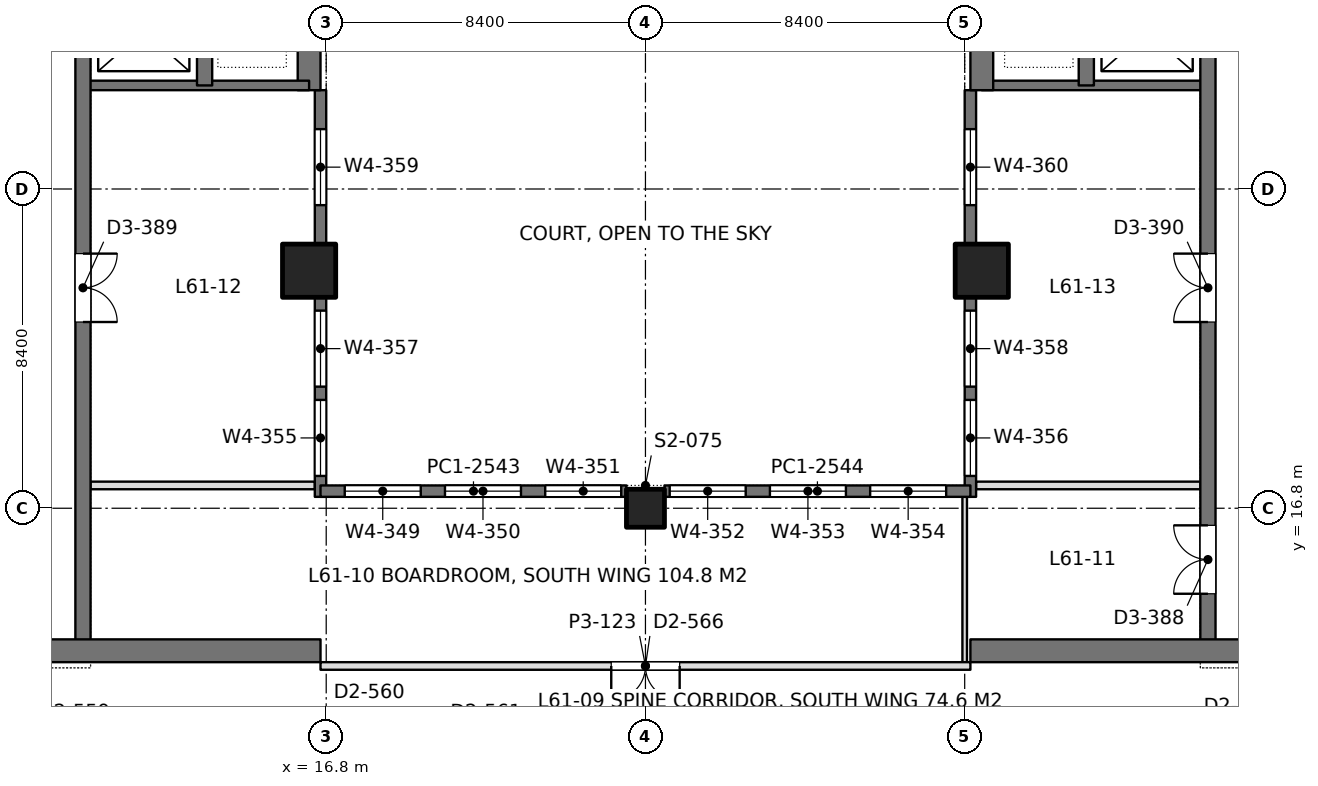
"""IFC4 building model, lengths in metres.
Left out: names, types, materials, properties, quantities, classifications, styles, units other than length and angle.
Written with IfcOpenShell. Run it as: python <this file> out.ifc"""

import sys

from ifc_helpers import new_model, si_unit, direction, frame, frame_2d, origin, origin_2d, place, context, subcontext, project, spatial, rectangle, extrude, element, fill, save


model = new_model("IFC4")
c1 = context("Model", 3, precision=1e-05, world=origin(), true_north=direction((0.0, 1.0)))
c2 = subcontext(c1, "Body", "Model", "MODEL_VIEW")
j1 = project(units=[si_unit("LENGTHUNIT", "METRE"), si_unit("PLANEANGLEUNIT", "RADIAN")], contexts=[c1])
p1 = place(None, origin())
s1 = spatial("IfcSite", under=j1, at=p1, CompositionType="ELEMENT")
p2 = place(p1, origin())
s2 = spatial("IfcBuilding", under=s1, at=p2, CompositionType="ELEMENT")
p3 = place(p2, frame((0.0, 0.0, 268.2)))
s3 = spatial("IfcBuildingStorey", under=s2, at=p3, CompositionType="ELEMENT", Elevation=268.2)
p4 = place(p3, frame((25.2, 16.8, 0.0), z_axis=(0.0, 0.0, 1.0), x_axis=(1.0, 0.0, 0.0)))
e1 = element("IfcColumn", 1, at=p4, inside=s3, PredefinedType="COLUMN", context=c2, shape_type="SweptSolid", body=[
    extrude(rectangle(XDim=1.0, YDim=1.0, at=origin_2d()), origin(), (0.0, 0.0, 1.0), 4.5),
])
for number, where, z_axis, x_axis in (
    (2, (16.35, 23.05, 0.0), (0.0, 0.0, 1.0), (1.0, 0.0, 0.0)),
    (3, (34.05, 23.05, 0.0), (0.0, 0.0, 1.0), (1.0, 0.0, 0.0)),
):
    element("IfcColumn", number, at=place(p3, frame(where, z_axis=z_axis, x_axis=x_axis)), inside=s3, PredefinedType="COLUMN", context=c2, shape_type="SweptSolid", body=[
        extrude(rectangle(XDim=1.4, YDim=1.4, at=origin_2d()), origin(), (0.0, 0.0, 1.0), 4.5),
    ])
p5 = place(p3, frame((-1.05, 13.05, 0.0), z_axis=(0.0, 0.0, 1.0), x_axis=(1.0, 0.0, 0.0)))
e4 = element("IfcWall", 4, at=p5, inside=s3, PredefinedType="SHEAR", context=c2, shape_type="SweptSolid", body=[
    extrude(rectangle(XDim=17.7, YDim=0.6, at=frame_2d((8.85, 0.0))), origin(), (0.0, 0.0, 1.0), 4.5),
])
p6 = place(p5, frame((8.8, 0.0, 0.0)))
e5 = element("IfcOpeningElement", 5, at=p6, cuts=e4, PredefinedType="OPENING", context=c2, shape_type="SweptSolid", body=[
    extrude(rectangle(XDim=1.8, YDim=2.4, at=frame_2d((0.9, 1.2))), frame((0.0, 0.31, 0.0), z_axis=(0.0, -1.0, 0.0), x_axis=(1.0, 0.0, 0.0)), (0.0, 0.0, 1.0), 0.62),
])
p7 = place(p3, frame((16.35, 27.8, 0.0), z_axis=(0.0, 0.0, 1.0), x_axis=(0.0, 1.0, 0.0)))
e6 = element("IfcWall", 6, at=p7, inside=s3, PredefinedType="SHEAR", context=c2, shape_type="SweptSolid", body=[
    extrude(rectangle(XDim=9.55, YDim=0.6, at=frame_2d((4.775, 0.0))), origin(), (0.0, 0.0, 1.0), 4.5),
])
p8 = place(p3, frame((10.4, 13.05, 0.0), z_axis=(0.0, 0.0, 1.0), x_axis=(0.0, 1.0, 0.0)))
e7 = element("IfcWall", 7, at=p8, inside=s3, PredefinedType="SHEAR", context=c2, shape_type="SweptSolid", body=[
    extrude(rectangle(XDim=24.3, YDim=0.4, at=frame_2d((12.15, 0.0))), origin(), (0.0, 0.0, 1.0), 4.5),
])
p9 = place(p8, frame((15.75, 0.0, 0.0)))
e8 = element("IfcOpeningElement", 8, at=p9, cuts=e7, PredefinedType="OPENING", context=c2, shape_type="SweptSolid", body=[
    extrude(rectangle(XDim=1.1, YDim=2.2, at=frame_2d((0.55, 1.1))), frame((0.0, 0.21, 0.0), z_axis=(0.0, -1.0, 0.0), x_axis=(1.0, 0.0, 0.0)), (0.0, 0.0, 1.0), 0.42),
])
p10 = place(p8, frame((18.6, 0.0, 0.0)))
e9 = element("IfcOpeningElement", 9, at=p10, cuts=e7, PredefinedType="OPENING", context=c2, shape_type="SweptSolid", body=[
    extrude(rectangle(XDim=1.1, YDim=2.2, at=frame_2d((0.55, 1.1))), frame((0.0, 0.21, 0.0), z_axis=(0.0, -1.0, 0.0), x_axis=(1.0, 0.0, 0.0)), (0.0, 0.0, 1.0), 0.42),
])
p11 = place(p8, frame((21.45, 0.0, 0.0)))
e10 = element("IfcOpeningElement", 10, at=p11, cuts=e7, PredefinedType="OPENING", context=c2, shape_type="SweptSolid", body=[
    extrude(rectangle(XDim=1.1, YDim=2.2, at=frame_2d((0.55, 1.1))), frame((0.0, 0.21, 0.0), z_axis=(0.0, -1.0, 0.0), x_axis=(1.0, 0.0, 0.0)), (0.0, 0.0, 1.0), 0.42),
])
p12 = place(p8, frame((8.65, 0.0, 0.0)))
e11 = element("IfcOpeningElement", 11, at=p12, cuts=e7, PredefinedType="OPENING", context=c2, shape_type="SweptSolid", body=[
    extrude(rectangle(XDim=1.8, YDim=2.4, at=frame_2d((0.9, 1.2))), frame((0.0, 0.21, 0.0), z_axis=(0.0, -1.0, 0.0), x_axis=(1.0, 0.0, 0.0)), (0.0, 0.0, 1.0), 0.42),
])
p13 = place(p3, frame((13.6, 27.925, 0.0), z_axis=(0.0, 0.0, 1.0), x_axis=(0.0, 1.0, 0.0)))
e12 = element("IfcWall", 12, at=p13, inside=s3, PredefinedType="SHEAR", context=c2, shape_type="SweptSolid", body=[
    extrude(rectangle(XDim=9.425, YDim=0.4, at=frame_2d((4.712, 0.0))), origin(), (0.0, 0.0, 1.0), 4.5),
])
p14 = place(p3, frame((10.4, 27.925, 0.0), z_axis=(0.0, 0.0, 1.0), x_axis=(1.0, 0.0, 0.0)))
e13 = element("IfcWall", 13, at=p14, inside=s3, PredefinedType="SHEAR", context=c2, shape_type="SweptSolid", body=[
    extrude(rectangle(XDim=5.95, YDim=0.25, at=frame_2d((2.975, 0.0))), origin(), (0.0, 0.0, 1.0), 4.5),
])
p15 = place(p3, frame((33.75, 13.05, 0.0), z_axis=(0.0, 0.0, 1.0), x_axis=(1.0, 0.0, 0.0)))
e14 = element("IfcWall", 14, at=p15, inside=s3, PredefinedType="SHEAR", context=c2, shape_type="SweptSolid", body=[
    extrude(rectangle(XDim=17.7, YDim=0.6, at=frame_2d((8.85, 0.0))), origin(), (0.0, 0.0, 1.0), 4.5),
])
p16 = place(p15, frame((7.1, 0.0, 0.0)))
e15 = element("IfcOpeningElement", 15, at=p16, cuts=e14, PredefinedType="OPENING", context=c2, shape_type="SweptSolid", body=[
    extrude(rectangle(XDim=1.8, YDim=2.4, at=frame_2d((0.9, 1.2))), frame((0.0, 0.31, 0.0), z_axis=(0.0, -1.0, 0.0), x_axis=(1.0, 0.0, 0.0)), (0.0, 0.0, 1.0), 0.62),
])
p17 = place(p3, frame((34.05, 27.8, 0.0), z_axis=(0.0, 0.0, 1.0), x_axis=(0.0, 1.0, 0.0)))
e16 = element("IfcWall", 16, at=p17, inside=s3, PredefinedType="SHEAR", context=c2, shape_type="SweptSolid", body=[
    extrude(rectangle(XDim=9.55, YDim=0.6, at=frame_2d((4.775, 0.0))), origin(), (0.0, 0.0, 1.0), 4.5),
])
p18 = place(p3, frame((40.0, 13.05, 0.0), z_axis=(0.0, 0.0, 1.0), x_axis=(0.0, 1.0, 0.0)))
e17 = element("IfcWall", 17, at=p18, inside=s3, PredefinedType="SHEAR", context=c2, shape_type="SweptSolid", body=[
    extrude(rectangle(XDim=24.3, YDim=0.4, at=frame_2d((12.15, 0.0))), origin(), (0.0, 0.0, 1.0), 4.5),
])
p19 = place(p18, frame((15.75, 0.0, 0.0)))
e18 = element("IfcOpeningElement", 18, at=p19, cuts=e17, PredefinedType="OPENING", context=c2, shape_type="SweptSolid", body=[
    extrude(rectangle(XDim=1.1, YDim=2.2, at=frame_2d((0.55, 1.1))), frame((0.0, 0.21, 0.0), z_axis=(0.0, -1.0, 0.0), x_axis=(1.0, 0.0, 0.0)), (0.0, 0.0, 1.0), 0.42),
])
p20 = place(p18, frame((18.6, 0.0, 0.0)))
e19 = element("IfcOpeningElement", 19, at=p20, cuts=e17, PredefinedType="OPENING", context=c2, shape_type="SweptSolid", body=[
    extrude(rectangle(XDim=1.1, YDim=2.2, at=frame_2d((0.55, 1.1))), frame((0.0, 0.21, 0.0), z_axis=(0.0, -1.0, 0.0), x_axis=(1.0, 0.0, 0.0)), (0.0, 0.0, 1.0), 0.42),
])
p21 = place(p18, frame((21.45, 0.0, 0.0)))
e20 = element("IfcOpeningElement", 20, at=p21, cuts=e17, PredefinedType="OPENING", context=c2, shape_type="SweptSolid", body=[
    extrude(rectangle(XDim=1.1, YDim=2.2, at=frame_2d((0.55, 1.1))), frame((0.0, 0.21, 0.0), z_axis=(0.0, -1.0, 0.0), x_axis=(1.0, 0.0, 0.0)), (0.0, 0.0, 1.0), 0.42),
])
p22 = place(p18, frame((8.65, 0.0, 0.0)))
e21 = element("IfcOpeningElement", 21, at=p22, cuts=e17, PredefinedType="OPENING", context=c2, shape_type="SweptSolid", body=[
    extrude(rectangle(XDim=1.8, YDim=2.4, at=frame_2d((0.9, 1.2))), frame((0.0, 0.21, 0.0), z_axis=(0.0, -1.0, 0.0), x_axis=(1.0, 0.0, 0.0)), (0.0, 0.0, 1.0), 0.42),
])
p23 = place(p18, frame((1.5, 0.0, 0.0)))
e22 = element("IfcOpeningElement", 22, at=p23, cuts=e17, PredefinedType="OPENING", context=c2, shape_type="SweptSolid", body=[
    extrude(rectangle(XDim=1.8, YDim=2.4, at=frame_2d((0.9, 1.2))), frame((0.0, 0.21, 0.0), z_axis=(0.0, -1.0, 0.0), x_axis=(1.0, 0.0, 0.0)), (0.0, 0.0, 1.0), 0.42),
])
p24 = place(p3, frame((36.8, 27.925, 0.0), z_axis=(0.0, 0.0, 1.0), x_axis=(0.0, 1.0, 0.0)))
e23 = element("IfcWall", 23, at=p24, inside=s3, PredefinedType="SHEAR", context=c2, shape_type="SweptSolid", body=[
    extrude(rectangle(XDim=9.425, YDim=0.4, at=frame_2d((4.712, 0.0))), origin(), (0.0, 0.0, 1.0), 4.5),
])
p25 = place(p3, frame((40.0, 27.925, 0.0), z_axis=(0.0, 0.0, 1.0), x_axis=(-1.0, 0.0, 0.0)))
e24 = element("IfcWall", 24, at=p25, inside=s3, PredefinedType="SHEAR", context=c2, shape_type="SweptSolid", body=[
    extrude(rectangle(XDim=5.95, YDim=0.25, at=frame_2d((2.975, 0.0))), origin(), (0.0, 0.0, 1.0), 4.5),
])
p26 = place(p3, frame((16.65, 17.1, 0.0), z_axis=(0.0, 0.0, 1.0), x_axis=(0.0, 1.0, 0.0)))
e25 = element("IfcWall", 25, at=p26, inside=s3, PredefinedType="SOLIDWALL", context=c2, shape_type="SweptSolid", body=[
    extrude(rectangle(XDim=10.7, YDim=0.3, at=frame_2d((5.35, 0.0))), origin(), (0.0, 0.0, 1.0), 4.35),
])
p27 = place(p26, frame((0.55, 0.0, 0.9)))
e26 = element("IfcOpeningElement", 26, at=p27, cuts=e25, PredefinedType="OPENING", context=c2, shape_type="SweptSolid", body=[
    extrude(rectangle(XDim=2.0, YDim=1.9, at=frame_2d((1.0, 0.95))), frame((0.0, 0.16, 0.0), z_axis=(0.0, -1.0, 0.0), x_axis=(1.0, 0.0, 0.0)), (0.0, 0.0, 1.0), 0.32),
])
p28 = place(p26, frame((2.9, 0.0, 0.9)))
e27 = element("IfcOpeningElement", 27, at=p28, cuts=e25, PredefinedType="OPENING", context=c2, shape_type="SweptSolid", body=[
    extrude(rectangle(XDim=2.0, YDim=1.9, at=frame_2d((1.0, 0.95))), frame((0.0, 0.16, 0.0), z_axis=(0.0, -1.0, 0.0), x_axis=(1.0, 0.0, 0.0)), (0.0, 0.0, 1.0), 0.32),
])
p29 = place(p26, frame((7.675, 0.0, 0.9)))
e28 = element("IfcOpeningElement", 28, at=p29, cuts=e25, PredefinedType="OPENING", context=c2, shape_type="SweptSolid", body=[
    extrude(rectangle(XDim=2.0, YDim=1.9, at=frame_2d((1.0, 0.95))), frame((0.0, 0.16, 0.0), z_axis=(0.0, -1.0, 0.0), x_axis=(1.0, 0.0, 0.0)), (0.0, 0.0, 1.0), 0.32),
])
p30 = place(p3, frame((33.75, 17.1, 0.0), z_axis=(0.0, 0.0, 1.0), x_axis=(0.0, 1.0, 0.0)))
e29 = element("IfcWall", 29, at=p30, inside=s3, PredefinedType="SOLIDWALL", context=c2, shape_type="SweptSolid", body=[
    extrude(rectangle(XDim=10.7, YDim=0.3, at=frame_2d((5.35, 0.0))), origin(), (0.0, 0.0, 1.0), 4.35),
])
p31 = place(p30, frame((0.55, 0.0, 0.9)))
e30 = element("IfcOpeningElement", 30, at=p31, cuts=e29, PredefinedType="OPENING", context=c2, shape_type="SweptSolid", body=[
    extrude(rectangle(XDim=2.0, YDim=1.9, at=frame_2d((1.0, 0.95))), frame((0.0, 0.16, 0.0), z_axis=(0.0, -1.0, 0.0), x_axis=(1.0, 0.0, 0.0)), (0.0, 0.0, 1.0), 0.32),
])
p32 = place(p30, frame((2.9, 0.0, 0.9)))
e31 = element("IfcOpeningElement", 31, at=p32, cuts=e29, PredefinedType="OPENING", context=c2, shape_type="SweptSolid", body=[
    extrude(rectangle(XDim=2.0, YDim=1.9, at=frame_2d((1.0, 0.95))), frame((0.0, 0.16, 0.0), z_axis=(0.0, -1.0, 0.0), x_axis=(1.0, 0.0, 0.0)), (0.0, 0.0, 1.0), 0.32),
])
p33 = place(p30, frame((7.675, 0.0, 0.9)))
e32 = element("IfcOpeningElement", 32, at=p33, cuts=e29, PredefinedType="OPENING", context=c2, shape_type="SweptSolid", body=[
    extrude(rectangle(XDim=2.0, YDim=1.9, at=frame_2d((1.0, 0.95))), frame((0.0, 0.16, 0.0), z_axis=(0.0, -1.0, 0.0), x_axis=(1.0, 0.0, 0.0)), (0.0, 0.0, 1.0), 0.32),
])
p34 = place(p3, frame((16.65, 17.25, 0.0), z_axis=(0.0, 0.0, 1.0), x_axis=(1.0, 0.0, 0.0)))
e33 = element("IfcWall", 33, at=p34, inside=s3, PredefinedType="SOLIDWALL", context=c2, shape_type="SweptSolid", body=[
    extrude(rectangle(XDim=8.05, YDim=0.3, at=frame_2d((4.025, 0.0))), origin(), (0.0, 0.0, 1.0), 4.35),
])
p35 = place(p34, frame((0.637, 0.0, 0.9)))
e34 = element("IfcOpeningElement", 34, at=p35, cuts=e33, PredefinedType="OPENING", context=c2, shape_type="SweptSolid", body=[
    extrude(rectangle(XDim=2.0, YDim=1.9, at=frame_2d((1.0, 0.95))), frame((0.0, 0.16, 0.0), z_axis=(0.0, -1.0, 0.0), x_axis=(1.0, 0.0, 0.0)), (0.0, 0.0, 1.0), 0.32),
])
p36 = place(p34, frame((3.275, 0.0, 0.9)))
e35 = element("IfcOpeningElement", 35, at=p36, cuts=e33, PredefinedType="OPENING", context=c2, shape_type="SweptSolid", body=[
    extrude(rectangle(XDim=2.0, YDim=1.9, at=frame_2d((1.0, 0.95))), frame((0.0, 0.16, 0.0), z_axis=(0.0, -1.0, 0.0), x_axis=(1.0, 0.0, 0.0)), (0.0, 0.0, 1.0), 0.32),
])
p37 = place(p34, frame((5.913, 0.0, 0.9)))
e36 = element("IfcOpeningElement", 36, at=p37, cuts=e33, PredefinedType="OPENING", context=c2, shape_type="SweptSolid", body=[
    extrude(rectangle(XDim=2.0, YDim=1.9, at=frame_2d((1.0, 0.95))), frame((0.0, 0.16, 0.0), z_axis=(0.0, -1.0, 0.0), x_axis=(1.0, 0.0, 0.0)), (0.0, 0.0, 1.0), 0.32),
])
p38 = place(p3, frame((25.7, 17.25, 0.0), z_axis=(0.0, 0.0, 1.0), x_axis=(1.0, 0.0, 0.0)))
e37 = element("IfcWall", 37, at=p38, inside=s3, PredefinedType="SOLIDWALL", context=c2, shape_type="SweptSolid", body=[
    extrude(rectangle(XDim=8.05, YDim=0.3, at=frame_2d((4.025, 0.0))), origin(), (0.0, 0.0, 1.0), 4.35),
])
p39 = place(p38, frame((0.137, 0.0, 0.9)))
e38 = element("IfcOpeningElement", 38, at=p39, cuts=e37, PredefinedType="OPENING", context=c2, shape_type="SweptSolid", body=[
    extrude(rectangle(XDim=2.0, YDim=1.9, at=frame_2d((1.0, 0.95))), frame((0.0, 0.16, 0.0), z_axis=(0.0, -1.0, 0.0), x_axis=(1.0, 0.0, 0.0)), (0.0, 0.0, 1.0), 0.32),
])
p40 = place(p38, frame((2.775, 0.0, 0.9)))
e39 = element("IfcOpeningElement", 39, at=p40, cuts=e37, PredefinedType="OPENING", context=c2, shape_type="SweptSolid", body=[
    extrude(rectangle(XDim=2.0, YDim=1.9, at=frame_2d((1.0, 0.95))), frame((0.0, 0.16, 0.0), z_axis=(0.0, -1.0, 0.0), x_axis=(1.0, 0.0, 0.0)), (0.0, 0.0, 1.0), 0.32),
])
p41 = place(p38, frame((5.413, 0.0, 0.9)))
e40 = element("IfcOpeningElement", 40, at=p41, cuts=e37, PredefinedType="OPENING", context=c2, shape_type="SweptSolid", body=[
    extrude(rectangle(XDim=2.0, YDim=1.9, at=frame_2d((1.0, 0.95))), frame((0.0, 0.16, 0.0), z_axis=(0.0, -1.0, 0.0), x_axis=(1.0, 0.0, 0.0)), (0.0, 0.0, 1.0), 0.32),
])
for number, where, z_axis, x_axis in (
    (41, (10.598, 17.4, 0.0), (0.0, 0.0, 1.0), (1.0, 0.0, 0.0)),
    (42, (33.898, 17.4, 0.0), (0.0, 0.0, 1.0), (1.0, 0.0, 0.0)),
):
    element("IfcWall", number, at=place(p3, frame(where, z_axis=z_axis, x_axis=x_axis)), inside=s3, PredefinedType="PARTITIONING", context=c2, shape_type="SweptSolid", body=[
        extrude(rectangle(XDim=5.904, YDim=0.2, at=frame_2d((2.952, 0.0))), origin(), (0.0, 0.0, 1.0), 3.8),
    ])
p42 = place(p3, frame((33.6, 12.6, 0.0), z_axis=(0.0, 0.0, 1.0), x_axis=(0.0, 1.0, 0.0)))
e43 = element("IfcWall", 43, at=p42, inside=s3, PredefinedType="PARTITIONING", context=c2, shape_type="SweptSolid", body=[
    extrude(rectangle(XDim=4.502, YDim=0.12, at=frame_2d((2.251, 0.0))), origin(), (0.0, 0.0, 1.0), 3.66),
])
p43 = place(p3, frame((16.65, 12.65, 0.0), z_axis=(0.0, 0.0, 1.0), x_axis=(1.0, 0.0, 0.0)))
e44 = element("IfcWall", 44, at=p43, inside=s3, PredefinedType="PARTITIONING", context=c2, shape_type="SweptSolid", body=[
    extrude(rectangle(XDim=17.1, YDim=0.2, at=frame_2d((8.55, 0.0))), origin(), (0.0, 0.0, 1.0), 3.8),
])
p44 = place(p43, frame((7.65, 0.0, 0.0)))
e45 = element("IfcOpeningElement", 45, at=p44, cuts=e44, PredefinedType="OPENING", context=c2, shape_type="SweptSolid", body=[
    extrude(rectangle(XDim=1.8, YDim=2.2, at=frame_2d((0.9, 1.1))), frame((0.0, 0.11, 0.0), z_axis=(0.0, -1.0, 0.0), x_axis=(1.0, 0.0, 0.0)), (0.0, 0.0, 1.0), 0.22),
])
p45 = place(p27, origin())
e46 = element("IfcWindow", 46, at=p45, inside=s3, PartitioningType="SINGLE_PANEL", PredefinedType="WINDOW", context=c2, shape_type="SweptSolid", body=[
    extrude(rectangle(XDim=2.0, YDim=1.9, at=frame_2d((1.0, 0.95))), frame((0.0, 0.03, 0.0), z_axis=(0.0, -1.0, 0.0), x_axis=(1.0, 0.0, 0.0)), (0.0, 0.0, 1.0), 0.06),
])
fill(e26, e46)
p46 = place(p28, origin())
e47 = element("IfcWindow", 47, at=p46, inside=s3, PartitioningType="SINGLE_PANEL", PredefinedType="WINDOW", context=c2, shape_type="SweptSolid", body=[
    extrude(rectangle(XDim=2.0, YDim=1.9, at=frame_2d((1.0, 0.95))), frame((0.0, 0.03, 0.0), z_axis=(0.0, -1.0, 0.0), x_axis=(1.0, 0.0, 0.0)), (0.0, 0.0, 1.0), 0.06),
])
fill(e27, e47)
p47 = place(p29, origin())
e48 = element("IfcWindow", 48, at=p47, inside=s3, PartitioningType="SINGLE_PANEL", PredefinedType="WINDOW", context=c2, shape_type="SweptSolid", body=[
    extrude(rectangle(XDim=2.0, YDim=1.9, at=frame_2d((1.0, 0.95))), frame((0.0, 0.03, 0.0), z_axis=(0.0, -1.0, 0.0), x_axis=(1.0, 0.0, 0.0)), (0.0, 0.0, 1.0), 0.06),
])
fill(e28, e48)
p48 = place(p31, origin())
e49 = element("IfcWindow", 49, at=p48, inside=s3, PartitioningType="SINGLE_PANEL", PredefinedType="WINDOW", context=c2, shape_type="SweptSolid", body=[
    extrude(rectangle(XDim=2.0, YDim=1.9, at=frame_2d((1.0, 0.95))), frame((0.0, 0.03, 0.0), z_axis=(0.0, -1.0, 0.0), x_axis=(1.0, 0.0, 0.0)), (0.0, 0.0, 1.0), 0.06),
])
fill(e30, e49)
p49 = place(p32, origin())
e50 = element("IfcWindow", 50, at=p49, inside=s3, PartitioningType="SINGLE_PANEL", PredefinedType="WINDOW", context=c2, shape_type="SweptSolid", body=[
    extrude(rectangle(XDim=2.0, YDim=1.9, at=frame_2d((1.0, 0.95))), frame((0.0, 0.03, 0.0), z_axis=(0.0, -1.0, 0.0), x_axis=(1.0, 0.0, 0.0)), (0.0, 0.0, 1.0), 0.06),
])
fill(e31, e50)
p50 = place(p33, origin())
e51 = element("IfcWindow", 51, at=p50, inside=s3, PartitioningType="SINGLE_PANEL", PredefinedType="WINDOW", context=c2, shape_type="SweptSolid", body=[
    extrude(rectangle(XDim=2.0, YDim=1.9, at=frame_2d((1.0, 0.95))), frame((0.0, 0.03, 0.0), z_axis=(0.0, -1.0, 0.0), x_axis=(1.0, 0.0, 0.0)), (0.0, 0.0, 1.0), 0.06),
])
fill(e32, e51)
p51 = place(p35, origin())
e52 = element("IfcWindow", 52, at=p51, inside=s3, PartitioningType="SINGLE_PANEL", PredefinedType="WINDOW", context=c2, shape_type="SweptSolid", body=[
    extrude(rectangle(XDim=2.0, YDim=1.9, at=frame_2d((1.0, 0.95))), frame((0.0, 0.03, 0.0), z_axis=(0.0, -1.0, 0.0), x_axis=(1.0, 0.0, 0.0)), (0.0, 0.0, 1.0), 0.06),
])
fill(e34, e52)
p52 = place(p36, origin())
e53 = element("IfcWindow", 53, at=p52, inside=s3, PartitioningType="SINGLE_PANEL", PredefinedType="WINDOW", context=c2, shape_type="SweptSolid", body=[
    extrude(rectangle(XDim=2.0, YDim=1.9, at=frame_2d((1.0, 0.95))), frame((0.0, 0.03, 0.0), z_axis=(0.0, -1.0, 0.0), x_axis=(1.0, 0.0, 0.0)), (0.0, 0.0, 1.0), 0.06),
])
fill(e35, e53)
p53 = place(p37, origin())
e54 = element("IfcWindow", 54, at=p53, inside=s3, PartitioningType="SINGLE_PANEL", PredefinedType="WINDOW", context=c2, shape_type="SweptSolid", body=[
    extrude(rectangle(XDim=2.0, YDim=1.9, at=frame_2d((1.0, 0.95))), frame((0.0, 0.03, 0.0), z_axis=(0.0, -1.0, 0.0), x_axis=(1.0, 0.0, 0.0)), (0.0, 0.0, 1.0), 0.06),
])
fill(e36, e54)
p54 = place(p39, origin())
e55 = element("IfcWindow", 55, at=p54, inside=s3, PartitioningType="SINGLE_PANEL", PredefinedType="WINDOW", context=c2, shape_type="SweptSolid", body=[
    extrude(rectangle(XDim=2.0, YDim=1.9, at=frame_2d((1.0, 0.95))), frame((0.0, 0.03, 0.0), z_axis=(0.0, -1.0, 0.0), x_axis=(1.0, 0.0, 0.0)), (0.0, 0.0, 1.0), 0.06),
])
fill(e38, e55)
p55 = place(p40, origin())
e56 = element("IfcWindow", 56, at=p55, inside=s3, PartitioningType="SINGLE_PANEL", PredefinedType="WINDOW", context=c2, shape_type="SweptSolid", body=[
    extrude(rectangle(XDim=2.0, YDim=1.9, at=frame_2d((1.0, 0.95))), frame((0.0, 0.03, 0.0), z_axis=(0.0, -1.0, 0.0), x_axis=(1.0, 0.0, 0.0)), (0.0, 0.0, 1.0), 0.06),
])
fill(e39, e56)
p56 = place(p41, origin())
e57 = element("IfcWindow", 57, at=p56, inside=s3, PartitioningType="SINGLE_PANEL", PredefinedType="WINDOW", context=c2, shape_type="SweptSolid", body=[
    extrude(rectangle(XDim=2.0, YDim=1.9, at=frame_2d((1.0, 0.95))), frame((0.0, 0.03, 0.0), z_axis=(0.0, -1.0, 0.0), x_axis=(1.0, 0.0, 0.0)), (0.0, 0.0, 1.0), 0.06),
])
fill(e40, e57)
p57 = place(p12, frame((1.8, 0.0, 0.0), z_axis=(0.0, 0.0, 1.0), x_axis=(-1.0, 0.0, 0.0)))
e58 = element("IfcDoor", 58, at=p57, inside=s3, OperationType="DOUBLE_DOOR_SINGLE_SWING", PredefinedType="DOOR", context=c2, shape_type="SweptSolid", body=[
    extrude(rectangle(XDim=1.8, YDim=2.4, at=frame_2d((0.9, 1.2))), frame((0.0, 0.025, 0.0), z_axis=(0.0, -1.0, 0.0), x_axis=(1.0, 0.0, 0.0)), (0.0, 0.0, 1.0), 0.05),
])
fill(e11, e58)
p58 = place(p22, origin())
e59 = element("IfcDoor", 59, at=p58, inside=s3, OperationType="DOUBLE_DOOR_SINGLE_SWING", PredefinedType="DOOR", context=c2, shape_type="SweptSolid", body=[
    extrude(rectangle(XDim=1.8, YDim=2.4, at=frame_2d((0.9, 1.2))), frame((0.0, 0.025, 0.0), z_axis=(0.0, -1.0, 0.0), x_axis=(1.0, 0.0, 0.0)), (0.0, 0.0, 1.0), 0.05),
])
fill(e21, e59)
p59 = place(p23, origin())
e60 = element("IfcDoor", 60, at=p59, inside=s3, OperationType="DOUBLE_DOOR_SINGLE_SWING", PredefinedType="DOOR", context=c2, shape_type="SweptSolid", body=[
    extrude(rectangle(XDim=1.8, YDim=2.4, at=frame_2d((0.9, 1.2))), frame((0.0, 0.025, 0.0), z_axis=(0.0, -1.0, 0.0), x_axis=(1.0, 0.0, 0.0)), (0.0, 0.0, 1.0), 0.05),
])
fill(e22, e60)
p60 = place(p44, frame((1.8, 0.0, 0.0), z_axis=(0.0, 0.0, 1.0), x_axis=(-1.0, 0.0, 0.0)))
e61 = element("IfcDoor", 61, at=p60, inside=s3, OperationType="DOUBLE_DOOR_SINGLE_SWING", PredefinedType="DOOR", context=c2, shape_type="SweptSolid", body=[
    extrude(rectangle(XDim=1.8, YDim=2.2, at=frame_2d((0.9, 1.1))), frame((0.0, 0.025, 0.0), z_axis=(0.0, -1.0, 0.0), x_axis=(1.0, 0.0, 0.0)), (0.0, 0.0, 1.0), 0.05),
])
fill(e45, e61)
save(model, sys.argv[1])
